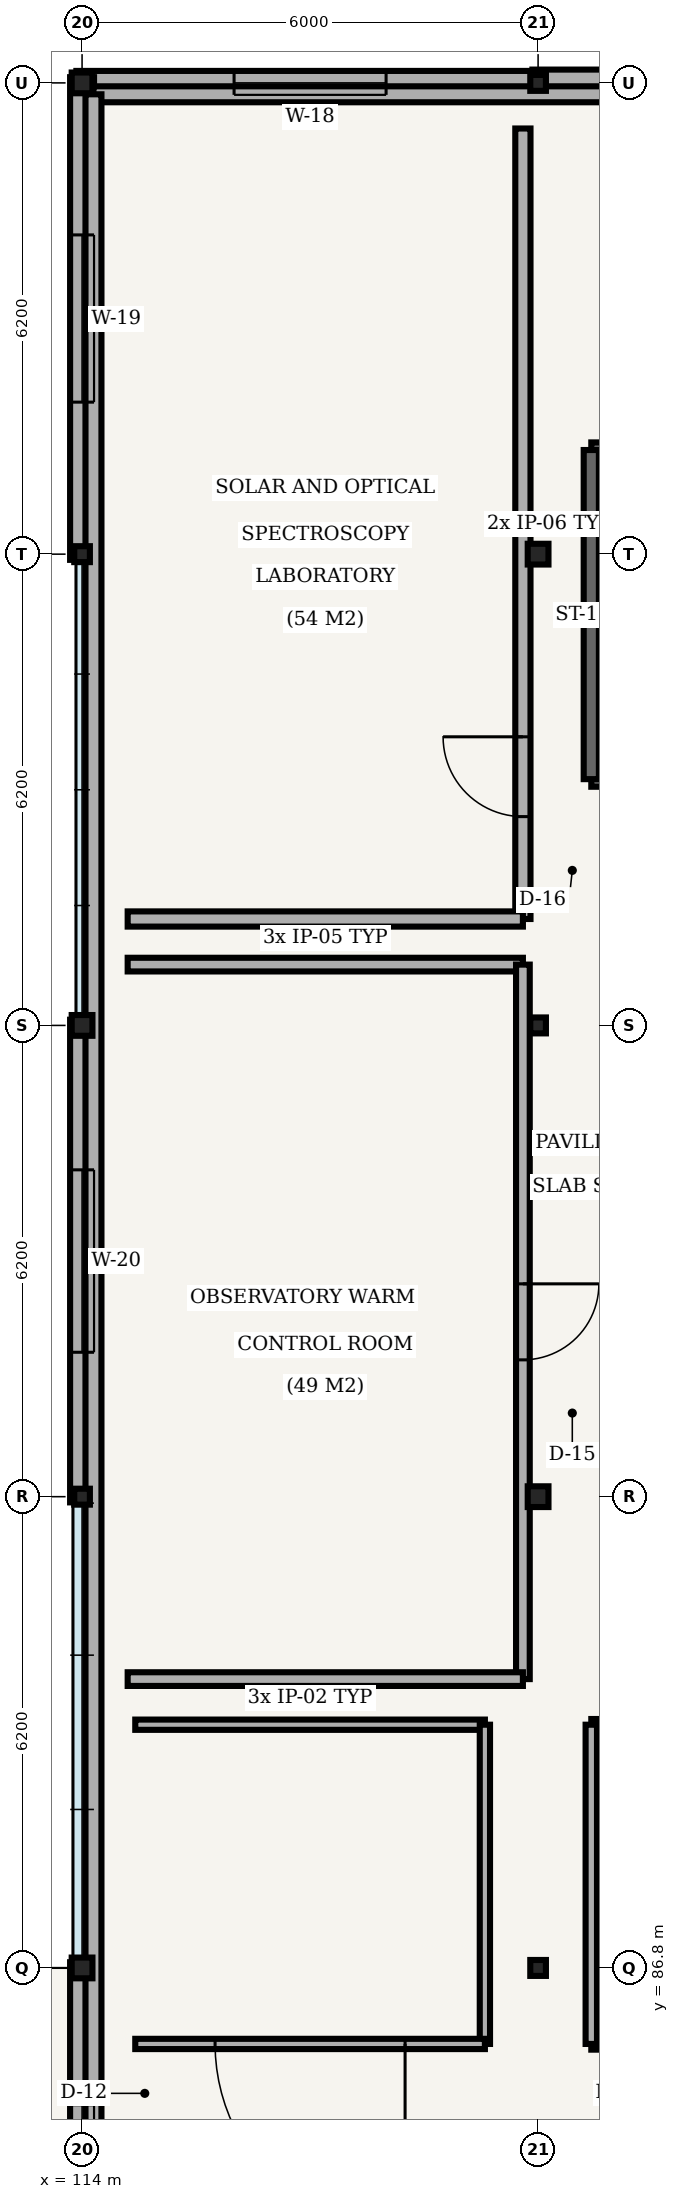
"""IFC4 building model, lengths in metres.
Left out: names, types, materials, properties, quantities, classifications, styles, units other than length and angle.
Written with IfcOpenShell. Run it as: python <this file> out.ifc"""

import sys

from ifc_helpers import new_model, si_unit, direction, frame, frame_2d, origin, origin_2d, place, context, subcontext, project, spatial, rectangle, hollow_circle, i_section, extrude, element, fill, save


model = new_model("IFC4")
c1 = context("Model", 3, precision=1e-05, world=origin(), true_north=direction((0.0, 1.0)))
c2 = subcontext(c1, "Body", "Model", "MODEL_VIEW")
j1 = project(units=[si_unit("LENGTHUNIT", "METRE"), si_unit("PLANEANGLEUNIT", "RADIAN")], contexts=[c1])
p1 = place(None, origin())
s1 = spatial("IfcSite", under=j1, at=p1, CompositionType="ELEMENT")
p2 = place(p1, origin())
s2 = spatial("IfcBuilding", under=s1, at=p2, CompositionType="ELEMENT")
p3 = place(p2, frame((0.0, 0.0, 25.2)))
s3 = spatial("IfcBuildingStorey", under=s2, at=p3, CompositionType="ELEMENT", Elevation=25.2)
p4 = place(p3, frame((114.0, 86.8, 0.0), z_axis=(0.0, 0.0, 1.0), x_axis=(1.0, 0.0, 0.0)))
e1 = element("IfcColumn", 1, at=p4, inside=s3, PredefinedType="COLUMN", context=c2, shape_type="SweptSolid", body=[
    extrude(hollow_circle(Radius=0.136, WallThickness=0.01, at=origin_2d()), origin(), (0.0, 0.0, 1.0), 4.41),
])
p5 = place(p3, frame((114.0, 93.0, 0.0), z_axis=(0.0, 0.0, 1.0), x_axis=(1.0, 0.0, 0.0)))
e2 = element("IfcColumn", 2, at=p5, inside=s3, PredefinedType="COLUMN", context=c2, shape_type="SweptSolid", body=[
    extrude(i_section(OverallWidth=0.206, OverallDepth=0.21, WebThickness=0.01, FlangeThickness=0.014, FilletRadius=0.01, at=origin_2d()), origin(), (0.0, 0.0, 1.0), 4.41),
])
p6 = place(p3, frame((114.0, 99.2, 0.0), z_axis=(0.0, 0.0, 1.0), x_axis=(1.0, 0.0, 0.0)))
e3 = element("IfcColumn", 3, at=p6, inside=s3, PredefinedType="COLUMN", context=c2, shape_type="SweptSolid", body=[
    extrude(hollow_circle(Radius=0.136, WallThickness=0.01, at=origin_2d()), origin(), (0.0, 0.0, 1.0), 4.41),
])
p7 = place(p3, frame((114.0, 105.4, 0.0), z_axis=(0.0, 0.0, 1.0), x_axis=(1.0, 0.0, 0.0)))
e4 = element("IfcColumn", 4, at=p7, inside=s3, PredefinedType="COLUMN", context=c2, shape_type="SweptSolid", body=[
    extrude(i_section(OverallWidth=0.206, OverallDepth=0.21, WebThickness=0.01, FlangeThickness=0.014, FilletRadius=0.01, at=origin_2d()), origin(), (0.0, 0.0, 1.0), 4.41),
])
p8 = place(p3, frame((114.0, 111.6, 0.0), z_axis=(0.0, 0.0, 1.0), x_axis=(1.0, 0.0, 0.0)))
e5 = element("IfcColumn", 5, at=p8, inside=s3, PredefinedType="COLUMN", context=c2, shape_type="SweptSolid", body=[
    extrude(hollow_circle(Radius=0.136, WallThickness=0.01, at=origin_2d()), origin(), (0.0, 0.0, 1.0), 4.41),
])
p9 = place(p3, frame((120.0, 86.8, 0.0), z_axis=(0.0, 0.0, 1.0), x_axis=(1.0, 0.0, 0.0)))
e6 = element("IfcColumn", 6, at=p9, inside=s3, PredefinedType="COLUMN", context=c2, shape_type="SweptSolid", body=[
    extrude(i_section(OverallWidth=0.206, OverallDepth=0.21, WebThickness=0.01, FlangeThickness=0.014, FilletRadius=0.01, at=origin_2d()), origin(), (0.0, 0.0, 1.0), 4.41),
])
p10 = place(p3, frame((120.0, 93.0, 0.0), z_axis=(0.0, 0.0, 1.0), x_axis=(1.0, 0.0, 0.0)))
e7 = element("IfcColumn", 7, at=p10, inside=s3, PredefinedType="COLUMN", context=c2, shape_type="SweptSolid", body=[
    extrude(hollow_circle(Radius=0.136, WallThickness=0.01, at=origin_2d()), origin(), (0.0, 0.0, 1.0), 4.41),
])
p11 = place(p3, frame((120.0, 99.2, 0.0), z_axis=(0.0, 0.0, 1.0), x_axis=(1.0, 0.0, 0.0)))
e8 = element("IfcColumn", 8, at=p11, inside=s3, PredefinedType="COLUMN", context=c2, shape_type="SweptSolid", body=[
    extrude(i_section(OverallWidth=0.206, OverallDepth=0.21, WebThickness=0.01, FlangeThickness=0.014, FilletRadius=0.01, at=origin_2d()), origin(), (0.0, 0.0, 1.0), 4.41),
])
p12 = place(p3, frame((120.0, 105.4, 0.0), z_axis=(0.0, 0.0, 1.0), x_axis=(1.0, 0.0, 0.0)))
e9 = element("IfcColumn", 9, at=p12, inside=s3, PredefinedType="COLUMN", context=c2, shape_type="SweptSolid", body=[
    extrude(hollow_circle(Radius=0.136, WallThickness=0.01, at=origin_2d()), origin(), (0.0, 0.0, 1.0), 4.41),
])
p13 = place(p3, frame((120.0, 111.6, 0.0), z_axis=(0.0, 0.0, 1.0), x_axis=(1.0, 0.0, 0.0)))
e10 = element("IfcColumn", 10, at=p13, inside=s3, PredefinedType="COLUMN", context=c2, shape_type="SweptSolid", body=[
    extrude(i_section(OverallWidth=0.206, OverallDepth=0.21, WebThickness=0.01, FlangeThickness=0.014, FilletRadius=0.01, at=origin_2d()), origin(), (0.0, 0.0, 1.0), 4.41),
])
p14 = place(p3, frame((126.075, 111.6, 0.0), z_axis=(0.0, 0.0, 1.0), x_axis=(-1.0, 0.0, 0.0)))
e11 = element("IfcWall", 11, at=p14, inside=s3, PredefinedType="SOLIDWALL", context=c2, shape_type="SweptSolid", body=[
    extrude(rectangle(XDim=6.15, YDim=0.35, at=frame_2d((3.075, 0.0))), origin(), (0.0, 0.0, 1.0), 3.92),
])
p15 = place(p3, frame((120.075, 111.6, 0.0), z_axis=(0.0, 0.0, 1.0), x_axis=(-1.0, 0.0, 0.0)))
e12 = element("IfcWall", 12, at=p15, inside=s3, PredefinedType="SOLIDWALL", context=c2, shape_type="SweptSolid", body=[
    extrude(rectangle(XDim=6.15, YDim=0.315, at=frame_2d((3.075, 0.0))), origin(), (0.0, 0.0, 1.0), 3.92),
])
p16 = place(p15, frame((2.075, 0.0, 0.9)))
e13 = element("IfcOpeningElement", 13, at=p16, cuts=e12, PredefinedType="OPENING", context=c2, shape_type="SweptSolid", body=[
    extrude(rectangle(XDim=2.0, YDim=1.5, at=frame_2d((1.0, 0.75))), frame((0.0, 0.167, 0.0), z_axis=(0.0, -1.0, 0.0), x_axis=(1.0, 0.0, 0.0)), (0.0, 0.0, 1.0), 0.335),
])
p17 = place(p3, frame((114.0, 111.675, 0.0), z_axis=(0.0, 0.0, 1.0), x_axis=(0.0, -1.0, 0.0)))
e14 = element("IfcWall", 14, at=p17, inside=s3, PredefinedType="SOLIDWALL", context=c2, shape_type="SweptSolid", body=[
    extrude(rectangle(XDim=6.35, YDim=0.315, at=frame_2d((3.175, 0.0))), origin(), (0.0, 0.0, 1.0), 3.92),
])
p18 = place(p17, frame((2.075, 0.0, 0.9)))
e15 = element("IfcOpeningElement", 15, at=p18, cuts=e14, PredefinedType="OPENING", context=c2, shape_type="SweptSolid", body=[
    extrude(rectangle(XDim=2.2, YDim=1.5, at=frame_2d((1.1, 0.75))), frame((0.0, 0.167, 0.0), z_axis=(0.0, -1.0, 0.0), x_axis=(1.0, 0.0, 0.0)), (0.0, 0.0, 1.0), 0.335),
])
p19 = place(p3, frame((114.0, 99.275, 0.0), z_axis=(0.0, 0.0, 1.0), x_axis=(0.0, -1.0, 0.0)))
e16 = element("IfcWall", 16, at=p19, inside=s3, PredefinedType="SOLIDWALL", context=c2, shape_type="SweptSolid", body=[
    extrude(rectangle(XDim=6.35, YDim=0.315, at=frame_2d((3.175, 0.0))), origin(), (0.0, 0.0, 1.0), 3.92),
])
p20 = place(p19, frame((1.975, 0.0, 0.9)))
e17 = element("IfcOpeningElement", 17, at=p20, cuts=e16, PredefinedType="OPENING", context=c2, shape_type="SweptSolid", body=[
    extrude(rectangle(XDim=2.4, YDim=1.5, at=frame_2d((1.2, 0.75))), frame((0.0, 0.167, 0.0), z_axis=(0.0, -1.0, 0.0), x_axis=(1.0, 0.0, 0.0)), (0.0, 0.0, 1.0), 0.335),
])
p21 = place(p3, frame((114.0, 86.875, 0.0), z_axis=(0.0, 0.0, 1.0), x_axis=(0.0, -1.0, 0.0)))
e18 = element("IfcWall", 18, at=p21, inside=s3, PredefinedType="SOLIDWALL", context=c2, shape_type="SweptSolid", body=[
    extrude(rectangle(XDim=6.35, YDim=0.315, at=frame_2d((3.175, 0.0))), origin(), (0.0, 0.0, 1.0), 3.92),
])
p22 = place(p21, frame((1.875, 0.0, 0.9)))
e19 = element("IfcOpeningElement", 19, at=p22, cuts=e18, PredefinedType="OPENING", context=c2, shape_type="SweptSolid", body=[
    extrude(rectangle(XDim=2.6, YDim=1.5, at=frame_2d((1.3, 0.75))), frame((0.0, 0.167, 0.0), z_axis=(0.0, -1.0, 0.0), x_axis=(1.0, 0.0, 0.0)), (0.0, 0.0, 1.0), 0.335),
])
p23 = place(p3, frame((137.85, 111.45, 4.6), z_axis=(0.0, 0.0, 1.0), x_axis=(-1.0, 0.0, 0.0)))
e20 = element("IfcWall", 20, at=p23, inside=s3, PredefinedType="PARAPET", context=c2, shape_type="SweptSolid", body=[
    extrude(rectangle(XDim=23.7, YDim=0.21, at=frame_2d((11.85, 0.0))), origin(), (0.0, 0.0, 1.0), 0.9),
])
p24 = place(p3, frame((114.15, 111.45, 4.6), z_axis=(0.0, 0.0, 1.0), x_axis=(0.0, -1.0, 0.0)))
e21 = element("IfcWall", 21, at=p24, inside=s3, PredefinedType="PARAPET", context=c2, shape_type="SweptSolid", body=[
    extrude(rectangle(XDim=36.9, YDim=0.21, at=frame_2d((18.45, 0.0))), origin(), (0.0, 0.0, 1.0), 0.9),
])
p25 = place(p3, frame((120.7, 102.44, 0.0), z_axis=(0.0, 0.0, 1.0), x_axis=(1.0, 0.0, 0.0)))
e22 = element("IfcWall", 22, at=p25, inside=s3, PredefinedType="SHEAR", context=c2, shape_type="SweptSolid", body=[
    extrude(rectangle(XDim=3.34, YDim=0.2, at=frame_2d((1.67, 0.0))), origin(), (0.0, 0.0, 1.0), 3.85),
])
p26 = place(p25, frame((0.895, 0.0, 0.0)))
e23 = element("IfcOpeningElement", 23, at=p26, cuts=e22, PredefinedType="OPENING", context=c2, shape_type="SweptSolid", body=[
    extrude(rectangle(XDim=1.55, YDim=2.2, at=frame_2d((0.775, 1.1))), frame((0.0, 0.11, 0.0), z_axis=(0.0, -1.0, 0.0), x_axis=(1.0, 0.0, 0.0)), (0.0, 0.0, 1.0), 0.22),
])
p27 = place(p3, frame((124.04, 106.77, 0.0), z_axis=(0.0, 0.0, 1.0), x_axis=(-1.0, 0.0, 0.0)))
e24 = element("IfcWall", 24, at=p27, inside=s3, PredefinedType="SHEAR", context=c2, shape_type="SweptSolid", body=[
    extrude(rectangle(XDim=3.34, YDim=0.2, at=frame_2d((1.67, 0.0))), origin(), (0.0, 0.0, 1.0), 3.85),
])
p28 = place(p3, frame((120.7, 106.77, 0.0), z_axis=(0.0, 0.0, 1.0), x_axis=(0.0, -1.0, 0.0)))
e25 = element("IfcWall", 25, at=p28, inside=s3, PredefinedType="SHEAR", context=c2, shape_type="SweptSolid", body=[
    extrude(rectangle(XDim=4.33, YDim=0.2, at=frame_2d((2.165, 0.0))), origin(), (0.0, 0.0, 1.0), 3.85),
])
p29 = place(p3, frame((114.7, 90.0, 0.0), z_axis=(0.0, 0.0, 1.0), x_axis=(1.0, 0.0, 0.0)))
e26 = element("IfcWall", 26, at=p29, inside=s3, PredefinedType="PARTITIONING", context=c2, shape_type="SweptSolid", body=[
    extrude(rectangle(XDim=4.6, YDim=0.135, at=frame_2d((2.3, 0.0))), origin(), (0.0, 0.0, 1.0), 3.85),
])
p30 = place(p3, frame((119.3, 90.0, 0.0), z_axis=(0.0, 0.0, 1.0), x_axis=(0.0, -1.0, 0.0)))
e27 = element("IfcWall", 27, at=p30, inside=s3, PredefinedType="PARTITIONING", context=c2, shape_type="SweptSolid", body=[
    extrude(rectangle(XDim=4.2, YDim=0.135, at=frame_2d((2.1, 0.0))), origin(), (0.0, 0.0, 1.0), 3.85),
])
p31 = place(p3, frame((119.3, 85.8, 0.0), z_axis=(0.0, 0.0, 1.0), x_axis=(-1.0, 0.0, 0.0)))
e28 = element("IfcWall", 28, at=p31, inside=s3, PredefinedType="PARTITIONING", context=c2, shape_type="SweptSolid", body=[
    extrude(rectangle(XDim=4.6, YDim=0.135, at=frame_2d((2.3, 0.0))), origin(), (0.0, 0.0, 1.0), 3.85),
])
p32 = place(p31, frame((1.05, 0.0, 0.0)))
e29 = element("IfcOpeningElement", 29, at=p32, cuts=e28, PredefinedType="OPENING", context=c2, shape_type="SweptSolid", body=[
    extrude(rectangle(XDim=2.5, YDim=2.1, at=frame_2d((1.25, 1.05))), frame((0.0, 0.077, 0.0), z_axis=(0.0, -1.0, 0.0), x_axis=(1.0, 0.0, 0.0)), (0.0, 0.0, 1.0), 0.155),
])
p33 = place(p3, frame((120.7, 90.0, 0.0), z_axis=(0.0, 0.0, 1.0), x_axis=(1.0, 0.0, 0.0)))
e30 = element("IfcWall", 30, at=p33, inside=s3, PredefinedType="PARTITIONING", context=c2, shape_type="SweptSolid", body=[
    extrude(rectangle(XDim=4.6, YDim=0.15, at=frame_2d((2.3, 0.0))), origin(), (0.0, 0.0, 1.0), 3.85),
])
p34 = place(p3, frame((125.3, 85.8, 0.0), z_axis=(0.0, 0.0, 1.0), x_axis=(-1.0, 0.0, 0.0)))
e31 = element("IfcWall", 31, at=p34, inside=s3, PredefinedType="PARTITIONING", context=c2, shape_type="SweptSolid", body=[
    extrude(rectangle(XDim=4.6, YDim=0.15, at=frame_2d((2.3, 0.0))), origin(), (0.0, 0.0, 1.0), 3.85),
])
p35 = place(p34, frame((1.85, 0.0, 0.0)))
e32 = element("IfcOpeningElement", 32, at=p35, cuts=e31, PredefinedType="OPENING", context=c2, shape_type="SweptSolid", body=[
    extrude(rectangle(XDim=0.9, YDim=2.25, at=frame_2d((0.45, 1.125))), frame((0.0, 0.085, 0.0), z_axis=(0.0, -1.0, 0.0), x_axis=(1.0, 0.0, 0.0)), (0.0, 0.0, 1.0), 0.17),
])
p36 = place(p3, frame((120.7, 85.8, 0.0), z_axis=(0.0, 0.0, 1.0), x_axis=(0.0, 1.0, 0.0)))
e33 = element("IfcWall", 33, at=p36, inside=s3, PredefinedType="PARTITIONING", context=c2, shape_type="SweptSolid", body=[
    extrude(rectangle(XDim=4.2, YDim=0.15, at=frame_2d((2.1, 0.0))), origin(), (0.0, 0.0, 1.0), 3.85),
])
p37 = place(p3, frame((114.6, 100.0, 0.0), z_axis=(0.0, 0.0, 1.0), x_axis=(1.0, 0.0, 0.0)))
e34 = element("IfcWall", 34, at=p37, inside=s3, PredefinedType="PARTITIONING", context=c2, shape_type="SweptSolid", body=[
    extrude(rectangle(XDim=5.2, YDim=0.18, at=frame_2d((2.6, 0.0))), origin(), (0.0, 0.0, 1.0), 3.85),
])
p38 = place(p3, frame((119.8, 100.0, 0.0), z_axis=(0.0, 0.0, 1.0), x_axis=(0.0, -1.0, 0.0)))
e35 = element("IfcWall", 35, at=p38, inside=s3, PredefinedType="PARTITIONING", context=c2, shape_type="SweptSolid", body=[
    extrude(rectangle(XDim=9.4, YDim=0.18, at=frame_2d((4.7, 0.0))), origin(), (0.0, 0.0, 1.0), 3.85),
])
p39 = place(p38, frame((4.2, 0.0, 0.0)))
e36 = element("IfcOpeningElement", 36, at=p39, cuts=e35, PredefinedType="OPENING", context=c2, shape_type="SweptSolid", body=[
    extrude(rectangle(XDim=1.0, YDim=2.25, at=frame_2d((0.5, 1.125))), frame((0.0, 0.1, 0.0), z_axis=(0.0, -1.0, 0.0), x_axis=(1.0, 0.0, 0.0)), (0.0, 0.0, 1.0), 0.2),
])
p40 = place(p3, frame((119.8, 90.6, 0.0), z_axis=(0.0, 0.0, 1.0), x_axis=(-1.0, 0.0, 0.0)))
e37 = element("IfcWall", 37, at=p40, inside=s3, PredefinedType="PARTITIONING", context=c2, shape_type="SweptSolid", body=[
    extrude(rectangle(XDim=5.2, YDim=0.18, at=frame_2d((2.6, 0.0))), origin(), (0.0, 0.0, 1.0), 3.85),
])
p41 = place(p3, frame((119.8, 111.0, 0.0), z_axis=(0.0, 0.0, 1.0), x_axis=(0.0, -1.0, 0.0)))
e38 = element("IfcWall", 38, at=p41, inside=s3, PredefinedType="PARTITIONING", context=c2, shape_type="SweptSolid", body=[
    extrude(rectangle(XDim=10.4, YDim=0.2, at=frame_2d((5.2, 0.0))), origin(), (0.0, 0.0, 1.0), 3.85),
])
p42 = place(p41, frame((8.003, 0.0, 0.0)))
e39 = element("IfcOpeningElement", 39, at=p42, cuts=e38, PredefinedType="OPENING", context=c2, shape_type="SweptSolid", body=[
    extrude(rectangle(XDim=1.05, YDim=2.25, at=frame_2d((0.525, 1.125))), frame((0.0, 0.11, 0.0), z_axis=(0.0, -1.0, 0.0), x_axis=(1.0, 0.0, 0.0)), (0.0, 0.0, 1.0), 0.22),
])
p43 = place(p3, frame((119.8, 100.6, 0.0), z_axis=(0.0, 0.0, 1.0), x_axis=(-1.0, 0.0, 0.0)))
e40 = element("IfcWall", 40, at=p43, inside=s3, PredefinedType="PARTITIONING", context=c2, shape_type="SweptSolid", body=[
    extrude(rectangle(XDim=5.2, YDim=0.2, at=frame_2d((2.6, 0.0))), origin(), (0.0, 0.0, 1.0), 3.85),
])
p44 = place(p16, origin())
e41 = element("IfcWindow", 41, at=p44, inside=s3, PartitioningType="DOUBLE_PANEL_VERTICAL", PredefinedType="WINDOW", context=c2, shape_type="SweptSolid", body=[
    extrude(rectangle(XDim=2.0, YDim=1.5, at=frame_2d((1.0, 0.75))), frame((0.0, 0.03, 0.0), z_axis=(0.0, -1.0, 0.0), x_axis=(1.0, 0.0, 0.0)), (0.0, 0.0, 1.0), 0.06),
])
fill(e13, e41)
p45 = place(p18, origin())
e42 = element("IfcWindow", 42, at=p45, inside=s3, PartitioningType="DOUBLE_PANEL_VERTICAL", PredefinedType="WINDOW", context=c2, shape_type="SweptSolid", body=[
    extrude(rectangle(XDim=2.2, YDim=1.5, at=frame_2d((1.1, 0.75))), frame((0.0, 0.03, 0.0), z_axis=(0.0, -1.0, 0.0), x_axis=(1.0, 0.0, 0.0)), (0.0, 0.0, 1.0), 0.06),
])
fill(e15, e42)
p46 = place(p20, origin())
e43 = element("IfcWindow", 43, at=p46, inside=s3, PartitioningType="DOUBLE_PANEL_VERTICAL", PredefinedType="WINDOW", context=c2, shape_type="SweptSolid", body=[
    extrude(rectangle(XDim=2.4, YDim=1.5, at=frame_2d((1.2, 0.75))), frame((0.0, 0.03, 0.0), z_axis=(0.0, -1.0, 0.0), x_axis=(1.0, 0.0, 0.0)), (0.0, 0.0, 1.0), 0.06),
])
fill(e17, e43)
p47 = place(p22, origin())
e44 = element("IfcWindow", 44, at=p47, inside=s3, PartitioningType="DOUBLE_PANEL_VERTICAL", PredefinedType="WINDOW", context=c2, shape_type="SweptSolid", body=[
    extrude(rectangle(XDim=2.6, YDim=1.5, at=frame_2d((1.3, 0.75))), frame((0.0, 0.03, 0.0), z_axis=(0.0, -1.0, 0.0), x_axis=(1.0, 0.0, 0.0)), (0.0, 0.0, 1.0), 0.06),
])
fill(e19, e44)
p48 = place(p32, origin())
e45 = element("IfcDoor", 45, at=p48, inside=s3, OperationType="DOUBLE_DOOR_SINGLE_SWING", PredefinedType="DOOR", context=c2, shape_type="SweptSolid", body=[
    extrude(rectangle(XDim=2.5, YDim=2.1, at=frame_2d((1.25, 1.05))), frame((0.0, 0.025, 0.0), z_axis=(0.0, -1.0, 0.0), x_axis=(1.0, 0.0, 0.0)), (0.0, 0.0, 1.0), 0.05),
])
fill(e29, e45)
p49 = place(p39, origin())
e46 = element("IfcDoor", 46, at=p49, inside=s3, OperationType="SINGLE_SWING_LEFT", PredefinedType="DOOR", context=c2, shape_type="SweptSolid", body=[
    extrude(rectangle(XDim=1.0, YDim=2.25, at=frame_2d((0.5, 1.125))), frame((0.0, 0.025, 0.0), z_axis=(0.0, -1.0, 0.0), x_axis=(1.0, 0.0, 0.0)), (0.0, 0.0, 1.0), 0.05),
])
fill(e36, e46)
p50 = place(p42, origin())
e47 = element("IfcDoor", 47, at=p50, inside=s3, OperationType="SINGLE_SWING_RIGHT", PredefinedType="DOOR", context=c2, shape_type="SweptSolid", body=[
    extrude(rectangle(XDim=1.05, YDim=2.25, at=frame_2d((0.525, 1.125))), frame((0.0, 0.025, 0.0), z_axis=(0.0, -1.0, 0.0), x_axis=(1.0, 0.0, 0.0)), (0.0, 0.0, 1.0), 0.05),
])
fill(e39, e47)
save(model, sys.argv[1])
